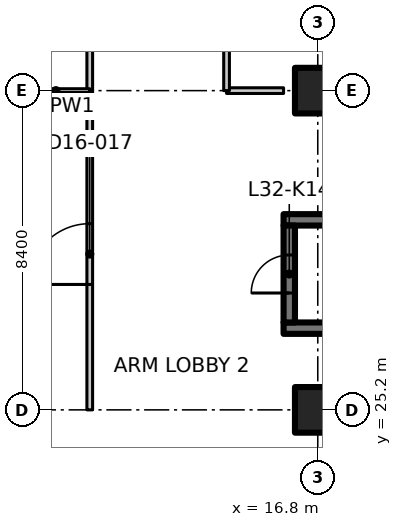
"""IFC4 building model, lengths in metres.
Left out: names, types, materials, properties, quantities, classifications, styles, units other than length and angle.
Written with IfcOpenShell. Run it as: python <this file> out.ifc"""

import sys

from ifc_helpers import new_model, si_unit, direction, frame, frame_2d, origin, origin_2d, place, context, subcontext, project, spatial, rectangle, extrude, element, fill, save


model = new_model("IFC4")
c1 = context("Model", 3, precision=1e-05, world=origin(), true_north=direction((0.0, 1.0)))
c2 = subcontext(c1, "Body", "Model", "MODEL_VIEW")
j1 = project(units=[si_unit("LENGTHUNIT", "METRE"), si_unit("PLANEANGLEUNIT", "RADIAN")], contexts=[c1])
p1 = place(None, origin())
s1 = spatial("IfcSite", under=j1, at=p1, CompositionType="ELEMENT")
p2 = place(p1, origin())
s2 = spatial("IfcBuilding", under=s1, at=p2, CompositionType="ELEMENT")
p3 = place(p2, frame((0.0, 0.0, 131.3)))
s3 = spatial("IfcBuildingStorey", under=s2, at=p3, CompositionType="ELEMENT", Elevation=131.3)
for number, where, z_axis, x_axis in (
    (1, (16.8, 25.2, 0.0), (0.0, 0.0, 1.0), (1.0, 0.0, 0.0)),
    (2, (16.8, 33.6, 0.0), (0.0, 0.0, 1.0), (1.0, 0.0, 0.0)),
):
    element("IfcColumn", number, at=place(p3, frame(where, z_axis=z_axis, x_axis=x_axis)), inside=s3, PredefinedType="COLUMN", context=c2, shape_type="SweptSolid", body=[
        extrude(rectangle(XDim=1.2, YDim=1.2, at=origin_2d()), origin(), (0.0, 0.0, 1.0), 3.35),
    ])
for number, where, z_axis, x_axis in (
    (3, (15.9, 27.35, 0.0), (0.0, 0.0, 1.0), (1.0, 0.0, 0.0)),
    (4, (15.9, 30.2, 0.0), (0.0, 0.0, 1.0), (1.0, 0.0, 0.0)),
):
    element("IfcWall", number, at=place(p3, frame(where, z_axis=z_axis, x_axis=x_axis)), inside=s3, PredefinedType="SHEAR", context=c2, shape_type="SweptSolid", body=[
        extrude(rectangle(XDim=8.2, YDim=0.3, at=frame_2d((4.1, 0.0))), origin(), (0.0, 0.0, 1.0), 3.35),
    ])
p4 = place(p3, frame((16.05, 27.5, 0.0), z_axis=(0.0, 0.0, 1.0), x_axis=(0.0, 1.0, 0.0)))
e5 = element("IfcWall", 5, at=p4, inside=s3, PredefinedType="SHEAR", context=c2, shape_type="SweptSolid", body=[
    extrude(rectangle(XDim=2.55, YDim=0.3, at=frame_2d((1.275, 0.0))), origin(), (0.0, 0.0, 1.0), 3.35),
])
p5 = place(p4, frame((0.775, 0.0, 0.0)))
e6 = element("IfcOpeningElement", 6, at=p5, cuts=e5, PredefinedType="OPENING", context=c2, shape_type="SweptSolid", body=[
    extrude(rectangle(XDim=1.0, YDim=2.1, at=frame_2d((0.5, 1.05))), frame((0.0, 0.16, 0.0), z_axis=(0.0, -1.0, 0.0), x_axis=(1.0, 0.0, 0.0)), (0.0, 0.0, 1.0), 0.32),
])
p6 = place(p3, frame((10.8, 25.2, 0.0), z_axis=(0.0, 0.0, 1.0), x_axis=(0.0, 1.0, 0.0)))
e7 = element("IfcWall", 7, at=p6, inside=s3, PredefinedType="PARTITIONING", context=c2, shape_type="SweptSolid", body=[
    extrude(rectangle(XDim=8.4, YDim=0.15, at=frame_2d((4.2, 0.0))), origin(), (0.0, 0.0, 1.0), 3.33),
])
p7 = place(p6, frame((3.3, 0.0, 0.0)))
e8 = element("IfcOpeningElement", 8, at=p7, cuts=e7, PredefinedType="OPENING", context=c2, shape_type="SweptSolid", body=[
    extrude(rectangle(XDim=1.6, YDim=2.1, at=frame_2d((0.8, 1.05))), frame((0.0, 0.085, 0.0), z_axis=(0.0, -1.0, 0.0), x_axis=(1.0, 0.0, 0.0)), (0.0, 0.0, 1.0), 0.17),
])
p8 = place(p3, frame((14.4, 33.6, 0.0), z_axis=(0.0, 0.0, 1.0), x_axis=(1.0, 0.0, 0.0)))
e9 = element("IfcWall", 9, at=p8, inside=s3, PredefinedType="PARTITIONING", context=c2, shape_type="SweptSolid", body=[
    extrude(rectangle(XDim=1.5, YDim=0.15, at=frame_2d((0.75, 0.0))), origin(), (0.0, 0.0, 1.0), 3.33),
])
p9 = place(p3, frame((10.8, 33.6, 0.0), z_axis=(0.0, 0.0, 1.0), x_axis=(0.0, 1.0, 0.0)))
e10 = element("IfcWall", 10, at=p9, inside=s3, PredefinedType="PARTITIONING", context=c2, shape_type="SweptSolid", body=[
    extrude(rectangle(XDim=4.2, YDim=0.15, at=frame_2d((2.1, 0.0))), origin(), (0.0, 0.0, 1.0), 3.33),
])
p10 = place(p9, frame((1.5, 0.0, 0.0)))
e11 = element("IfcOpeningElement", 11, at=p10, cuts=e10, PredefinedType="OPENING", context=c2, shape_type="SweptSolid", body=[
    extrude(rectangle(XDim=1.1, YDim=2.1, at=frame_2d((0.55, 1.05))), frame((0.0, 0.085, 0.0), z_axis=(0.0, -1.0, 0.0), x_axis=(1.0, 0.0, 0.0)), (0.0, 0.0, 1.0), 0.17),
])
p11 = place(p3, frame((14.4, 42.0, 0.0), z_axis=(0.0, 0.0, 1.0), x_axis=(0.0, -1.0, 0.0)))
e12 = element("IfcWall", 12, at=p11, inside=s3, PredefinedType="PARTITIONING", context=c2, shape_type="SweptSolid", body=[
    extrude(rectangle(XDim=8.4, YDim=0.15, at=frame_2d((4.2, 0.0))), origin(), (0.0, 0.0, 1.0), 3.33),
])
p12 = place(p3, frame((9.02, 33.6, 0.0), z_axis=(0.0, 0.0, 1.0), x_axis=(1.0, 0.0, 0.0)))
e13 = element("IfcWall", 13, at=p12, inside=s3, PredefinedType="PARTITIONING", context=c2, shape_type="SweptSolid", body=[
    extrude(rectangle(XDim=1.78, YDim=0.1, at=frame_2d((0.89, 0.0))), origin(), (0.0, 0.0, 1.0), 3.33),
])
p13 = place(p5, origin())
e14 = element("IfcDoor", 14, at=p13, inside=s3, OperationType="SINGLE_SWING_LEFT", PredefinedType="DOOR", context=c2, shape_type="SweptSolid", body=[
    extrude(rectangle(XDim=1.0, YDim=2.1, at=frame_2d((0.5, 1.05))), frame((0.0, 0.025, 0.0), z_axis=(0.0, -1.0, 0.0), x_axis=(1.0, 0.0, 0.0)), (0.0, 0.0, 1.0), 0.05),
])
fill(e6, e14)
p14 = place(p7, origin())
e15 = element("IfcDoor", 15, at=p14, inside=s3, OperationType="DOUBLE_DOOR_SINGLE_SWING", PredefinedType="DOOR", context=c2, shape_type="SweptSolid", body=[
    extrude(rectangle(XDim=1.6, YDim=2.1, at=frame_2d((0.8, 1.05))), frame((0.0, 0.025, 0.0), z_axis=(0.0, -1.0, 0.0), x_axis=(1.0, 0.0, 0.0)), (0.0, 0.0, 1.0), 0.05),
])
fill(e8, e15)
save(model, sys.argv[1])
